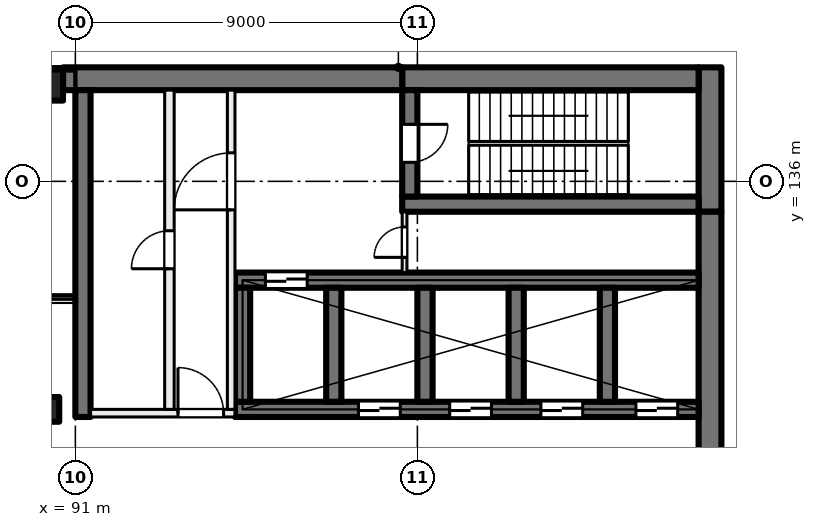
"""IFC4 building model, lengths in metres.
Left out: names, types, materials, properties, quantities, classifications, styles, units other than length and angle.
Written with IfcOpenShell. Run it as: python <this file> out.ifc"""

import sys

from ifc_helpers import new_model, si_unit, direction, frame, frame_2d, origin, origin_2d, place, context, subcontext, project, spatial, rectangle, extrude, element, fill, save


model = new_model("IFC4")
c1 = context("Model", 3, precision=1e-05, world=origin(), true_north=direction((0.0, 1.0)))
c2 = subcontext(c1, "Body", "Model", "MODEL_VIEW")
j1 = project(units=[si_unit("LENGTHUNIT", "METRE"), si_unit("PLANEANGLEUNIT", "RADIAN")], contexts=[c1])
p1 = place(None, origin())
s1 = spatial("IfcSite", under=j1, at=p1, CompositionType="ELEMENT")
p2 = place(p1, origin())
s2 = spatial("IfcBuilding", under=s1, at=p2, CompositionType="ELEMENT")
p3 = place(p2, frame((0.0, 0.0, 129.0)))
s3 = spatial("IfcBuildingStorey", under=s2, at=p3, CompositionType="ELEMENT", Elevation=129.0)
p4 = place(p3, frame((90.25, 130.0, 0.0), z_axis=(0.0, 0.0, 1.0), x_axis=(1.0, 0.0, 0.0)))
e1 = element("IfcColumn", 1, at=p4, inside=s3, PredefinedType="COLUMN", context=c2, shape_type="SweptSolid", body=[
    extrude(rectangle(XDim=0.65, YDim=0.65, at=origin_2d()), origin(), (0.0, 0.0, 1.0), 5.5),
])
p5 = place(p3, frame((90.25, 138.55, 0.0), z_axis=(0.0, 0.0, 1.0), x_axis=(1.0, 0.0, 0.0)))
e2 = element("IfcColumn", 2, at=p5, inside=s3, PredefinedType="COLUMN", context=c2, shape_type="SweptSolid", body=[
    extrude(rectangle(XDim=0.85, YDim=0.85, at=origin_2d()), origin(), (0.0, 0.0, 1.0), 5.5),
])
p6 = place(p3, frame((107.7, 139.0, 0.0), z_axis=(0.0, 0.0, 1.0), x_axis=(0.0, -1.0, 0.0)))
e3 = element("IfcWall", 3, at=p6, inside=s3, PredefinedType="SHEAR", context=c2, shape_type="SweptSolid", body=[
    extrude(rectangle(XDim=3.8, YDim=0.6, at=frame_2d((1.9, 0.0))), origin(), (0.0, 0.0, 1.0), 5.5),
])
p7 = place(p3, frame((107.7, 135.2, 0.0), z_axis=(0.0, 0.0, 1.0), x_axis=(0.0, -1.0, 0.0)))
e4 = element("IfcWall", 4, at=p7, inside=s3, PredefinedType="SHEAR", context=c2, shape_type="SweptSolid", body=[
    extrude(rectangle(XDim=14.4, YDim=0.6, at=frame_2d((7.2, 0.0))), origin(), (0.0, 0.0, 1.0), 5.5),
])
p8 = place(p3, frame((107.4, 138.7, 0.0), z_axis=(0.0, 0.0, 1.0), x_axis=(-1.0, 0.0, 0.0)))
e5 = element("IfcWall", 5, at=p8, inside=s3, PredefinedType="SHEAR", context=c2, shape_type="SweptSolid", body=[
    extrude(rectangle(XDim=7.8, YDim=0.6, at=frame_2d((3.9, 0.0))), origin(), (0.0, 0.0, 1.0), 5.5),
])
p9 = place(p3, frame((99.6, 138.7, 0.0), z_axis=(0.0, 0.0, 1.0), x_axis=(-1.0, 0.0, 0.0)))
e6 = element("IfcWall", 6, at=p9, inside=s3, PredefinedType="SHEAR", context=c2, shape_type="SweptSolid", body=[
    extrude(rectangle(XDim=8.925, YDim=0.6, at=frame_2d((4.462, 0.0))), origin(), (0.0, 0.0, 1.0), 5.5),
])
p10 = place(p3, frame((107.4, 135.4, 0.0), z_axis=(0.0, 0.0, 1.0), x_axis=(-1.0, 0.0, 0.0)))
e7 = element("IfcWall", 7, at=p10, inside=s3, PredefinedType="SHEAR", context=c2, shape_type="SweptSolid", body=[
    extrude(rectangle(XDim=7.8, YDim=0.4, at=frame_2d((3.9, 0.0))), origin(), (0.0, 0.0, 1.0), 5.5),
])
p11 = place(p3, frame((99.8, 138.4, 0.0), z_axis=(0.0, 0.0, 1.0), x_axis=(0.0, -1.0, 0.0)))
e8 = element("IfcWall", 8, at=p11, inside=s3, PredefinedType="SHEAR", context=c2, shape_type="SweptSolid", body=[
    extrude(rectangle(XDim=2.8, YDim=0.4, at=frame_2d((1.4, 0.0))), origin(), (0.0, 0.0, 1.0), 5.5),
])
p12 = place(p11, frame((0.9, 0.0, 0.0)))
e9 = element("IfcOpeningElement", 9, at=p12, cuts=e8, PredefinedType="OPENING", context=c2, shape_type="SweptSolid", body=[
    extrude(rectangle(XDim=1.0, YDim=2.1, at=frame_2d((0.5, 1.05))), frame((0.0, 0.21, 0.0), z_axis=(0.0, -1.0, 0.0), x_axis=(1.0, 0.0, 0.0)), (0.0, 0.0, 1.0), 0.42),
])
p13 = place(p3, frame((107.4, 130.0, 0.0), z_axis=(0.0, 0.0, 1.0), x_axis=(-1.0, 0.0, 0.0)))
e10 = element("IfcWall", 10, at=p13, inside=s3, PredefinedType="SHEAR", context=c2, shape_type="SweptSolid", body=[
    extrude(rectangle(XDim=12.2, YDim=0.4, at=frame_2d((6.1, 0.0))), origin(), (0.0, 0.0, 1.0), 5.5),
])
p14 = place(p13, frame((0.55, 0.0, 0.0)))
e11 = element("IfcOpeningElement", 11, at=p14, cuts=e10, PredefinedType="OPENING", context=c2, shape_type="SweptSolid", body=[
    extrude(rectangle(XDim=1.1, YDim=2.1, at=frame_2d((0.55, 1.05))), frame((0.0, 0.21, 0.0), z_axis=(0.0, -1.0, 0.0), x_axis=(1.0, 0.0, 0.0)), (0.0, 0.0, 1.0), 0.42),
])
p15 = place(p13, frame((3.05, 0.0, 0.0)))
e12 = element("IfcOpeningElement", 12, at=p15, cuts=e10, PredefinedType="OPENING", context=c2, shape_type="SweptSolid", body=[
    extrude(rectangle(XDim=1.1, YDim=2.1, at=frame_2d((0.55, 1.05))), frame((0.0, 0.21, 0.0), z_axis=(0.0, -1.0, 0.0), x_axis=(1.0, 0.0, 0.0)), (0.0, 0.0, 1.0), 0.42),
])
p16 = place(p13, frame((5.45, 0.0, 0.0)))
e13 = element("IfcOpeningElement", 13, at=p16, cuts=e10, PredefinedType="OPENING", context=c2, shape_type="SweptSolid", body=[
    extrude(rectangle(XDim=1.1, YDim=2.1, at=frame_2d((0.55, 1.05))), frame((0.0, 0.21, 0.0), z_axis=(0.0, -1.0, 0.0), x_axis=(1.0, 0.0, 0.0)), (0.0, 0.0, 1.0), 0.42),
])
p17 = place(p13, frame((7.85, 0.0, 0.0)))
e14 = element("IfcOpeningElement", 14, at=p17, cuts=e10, PredefinedType="OPENING", context=c2, shape_type="SweptSolid", body=[
    extrude(rectangle(XDim=1.1, YDim=2.1, at=frame_2d((0.55, 1.05))), frame((0.0, 0.21, 0.0), z_axis=(0.0, -1.0, 0.0), x_axis=(1.0, 0.0, 0.0)), (0.0, 0.0, 1.0), 0.42),
])
p18 = place(p3, frame((107.4, 133.4, 0.0), z_axis=(0.0, 0.0, 1.0), x_axis=(-1.0, 0.0, 0.0)))
e15 = element("IfcWall", 15, at=p18, inside=s3, PredefinedType="SHEAR", context=c2, shape_type="SweptSolid", body=[
    extrude(rectangle(XDim=12.2, YDim=0.4, at=frame_2d((6.1, 0.0))), origin(), (0.0, 0.0, 1.0), 5.5),
])
p19 = place(p18, frame((10.3, 0.0, 0.0)))
e16 = element("IfcOpeningElement", 16, at=p19, cuts=e15, PredefinedType="OPENING", context=c2, shape_type="SweptSolid", body=[
    extrude(rectangle(XDim=1.1, YDim=2.1, at=frame_2d((0.55, 1.05))), frame((0.0, 0.21, 0.0), z_axis=(0.0, -1.0, 0.0), x_axis=(1.0, 0.0, 0.0)), (0.0, 0.0, 1.0), 0.42),
])
for number, where, z_axis, x_axis in (
    (17, (105.0, 133.2, 0.0), (0.0, 0.0, 1.0), (0.0, -1.0, 0.0)),
    (18, (102.6, 133.2, 0.0), (0.0, 0.0, 1.0), (0.0, -1.0, 0.0)),
    (19, (100.2, 133.2, 0.0), (0.0, 0.0, 1.0), (0.0, -1.0, 0.0)),
    (20, (97.8, 133.2, 0.0), (0.0, 0.0, 1.0), (0.0, -1.0, 0.0)),
    (21, (95.4, 133.2, 0.0), (0.0, 0.0, 1.0), (0.0, -1.0, 0.0)),
):
    element("IfcWall", number, at=place(p3, frame(where, z_axis=z_axis, x_axis=x_axis)), inside=s3, PredefinedType="SHEAR", context=c2, shape_type="SweptSolid", body=[
        extrude(rectangle(XDim=3.0, YDim=0.4, at=frame_2d((1.5, 0.0))), origin(), (0.0, 0.0, 1.0), 5.5),
    ])
p20 = place(p3, frame((91.2, 138.4, 0.0), z_axis=(0.0, 0.0, 1.0), x_axis=(0.0, -1.0, 0.0)))
e22 = element("IfcWall", 22, at=p20, inside=s3, PredefinedType="SHEAR", context=c2, shape_type="SweptSolid", body=[
    extrude(rectangle(XDim=8.6, YDim=0.4, at=frame_2d((4.3, 0.0))), origin(), (0.0, 0.0, 1.0), 5.5),
])
p21 = place(p3, frame((91.4, 129.9, 0.0), z_axis=(0.0, 0.0, 1.0), x_axis=(1.0, 0.0, 0.0)))
e23 = element("IfcWall", 23, at=p21, inside=s3, PredefinedType="PARTITIONING", context=c2, shape_type="SweptSolid", body=[
    extrude(rectangle(XDim=3.8, YDim=0.2, at=frame_2d((1.9, 0.0))), origin(), (0.0, 0.0, 1.0), 5.125),
])
p22 = place(p21, frame((2.3, 0.0, 0.0)))
e24 = element("IfcOpeningElement", 24, at=p22, cuts=e23, PredefinedType="OPENING", context=c2, shape_type="SweptSolid", body=[
    extrude(rectangle(XDim=1.2, YDim=2.1, at=frame_2d((0.6, 1.05))), frame((0.0, 0.11, 0.0), z_axis=(0.0, -1.0, 0.0), x_axis=(1.0, 0.0, 0.0)), (0.0, 0.0, 1.0), 0.22),
])
p23 = place(p3, frame((95.1, 130.0, 0.0), z_axis=(0.0, 0.0, 1.0), x_axis=(0.0, 1.0, 0.0)))
e25 = element("IfcWall", 25, at=p23, inside=s3, PredefinedType="PARTITIONING", context=c2, shape_type="SweptSolid", body=[
    extrude(rectangle(XDim=8.4, YDim=0.2, at=frame_2d((4.2, 0.0))), origin(), (0.0, 0.0, 1.0), 5.125),
])
p24 = place(p23, frame((5.25, 0.0, 0.0)))
e26 = element("IfcOpeningElement", 26, at=p24, cuts=e25, PredefinedType="OPENING", context=c2, shape_type="SweptSolid", body=[
    extrude(rectangle(XDim=1.5, YDim=2.1, at=frame_2d((0.75, 1.05))), frame((0.0, 0.11, 0.0), z_axis=(0.0, -1.0, 0.0), x_axis=(1.0, 0.0, 0.0)), (0.0, 0.0, 1.0), 0.22),
])
p25 = place(p3, frame((93.475, 130.0, 0.0), z_axis=(0.0, 0.0, 1.0), x_axis=(0.0, 1.0, 0.0)))
e27 = element("IfcWall", 27, at=p25, inside=s3, PredefinedType="PARTITIONING", context=c2, shape_type="SweptSolid", body=[
    extrude(rectangle(XDim=8.4, YDim=0.25, at=frame_2d((4.2, 0.0))), origin(), (0.0, 0.0, 1.0), 5.125),
])
p26 = place(p25, frame((3.7, 0.0, 0.0)))
e28 = element("IfcOpeningElement", 28, at=p26, cuts=e27, PredefinedType="OPENING", context=c2, shape_type="SweptSolid", body=[
    extrude(rectangle(XDim=1.0, YDim=2.1, at=frame_2d((0.5, 1.05))), frame((0.0, 0.135, 0.0), z_axis=(0.0, -1.0, 0.0), x_axis=(1.0, 0.0, 0.0)), (0.0, 0.0, 1.0), 0.27),
])
p27 = place(p3, frame((99.663, 133.6, 0.0), z_axis=(0.0, 0.0, 1.0), x_axis=(0.0, 1.0, 0.0)))
e29 = element("IfcWall", 29, at=p27, inside=s3, PredefinedType="PARTITIONING", context=c2, shape_type="SweptSolid", body=[
    extrude(rectangle(XDim=1.6, YDim=0.125, at=frame_2d((0.8, 0.0))), origin(), (0.0, 0.0, 1.0), 5.125),
])
p28 = place(p27, frame((0.4, 0.0, 0.0)))
e30 = element("IfcOpeningElement", 30, at=p28, cuts=e29, PredefinedType="OPENING", context=c2, shape_type="SweptSolid", body=[
    extrude(rectangle(XDim=0.8, YDim=2.1, at=frame_2d((0.4, 1.05))), frame((0.0, 0.073, 0.0), z_axis=(0.0, -1.0, 0.0), x_axis=(1.0, 0.0, 0.0)), (0.0, 0.0, 1.0), 0.145),
])
p29 = place(p14, origin())
e31 = element("IfcDoor", 31, at=p29, inside=s3, OperationType="DOUBLE_DOOR_SLIDING", PredefinedType="DOOR", context=c2, shape_type="SweptSolid", body=[
    extrude(rectangle(XDim=1.1, YDim=2.1, at=frame_2d((0.55, 1.05))), frame((0.0, 0.025, 0.0), z_axis=(0.0, -1.0, 0.0), x_axis=(1.0, 0.0, 0.0)), (0.0, 0.0, 1.0), 0.05),
])
fill(e11, e31)
p30 = place(p15, origin())
e32 = element("IfcDoor", 32, at=p30, inside=s3, OperationType="DOUBLE_DOOR_SLIDING", PredefinedType="DOOR", context=c2, shape_type="SweptSolid", body=[
    extrude(rectangle(XDim=1.1, YDim=2.1, at=frame_2d((0.55, 1.05))), frame((0.0, 0.025, 0.0), z_axis=(0.0, -1.0, 0.0), x_axis=(1.0, 0.0, 0.0)), (0.0, 0.0, 1.0), 0.05),
])
fill(e12, e32)
p31 = place(p16, origin())
e33 = element("IfcDoor", 33, at=p31, inside=s3, OperationType="DOUBLE_DOOR_SLIDING", PredefinedType="DOOR", context=c2, shape_type="SweptSolid", body=[
    extrude(rectangle(XDim=1.1, YDim=2.1, at=frame_2d((0.55, 1.05))), frame((0.0, 0.025, 0.0), z_axis=(0.0, -1.0, 0.0), x_axis=(1.0, 0.0, 0.0)), (0.0, 0.0, 1.0), 0.05),
])
fill(e13, e33)
p32 = place(p17, origin())
e34 = element("IfcDoor", 34, at=p32, inside=s3, OperationType="DOUBLE_DOOR_SLIDING", PredefinedType="DOOR", context=c2, shape_type="SweptSolid", body=[
    extrude(rectangle(XDim=1.1, YDim=2.1, at=frame_2d((0.55, 1.05))), frame((0.0, 0.025, 0.0), z_axis=(0.0, -1.0, 0.0), x_axis=(1.0, 0.0, 0.0)), (0.0, 0.0, 1.0), 0.05),
])
fill(e14, e34)
p33 = place(p22, origin())
e35 = element("IfcDoor", 35, at=p33, inside=s3, OperationType="DOUBLE_DOOR_SINGLE_SWING", PredefinedType="DOOR", context=c2, shape_type="SweptSolid", body=[
    extrude(rectangle(XDim=1.2, YDim=2.1, at=frame_2d((0.6, 1.05))), frame((0.0, 0.025, 0.0), z_axis=(0.0, -1.0, 0.0), x_axis=(1.0, 0.0, 0.0)), (0.0, 0.0, 1.0), 0.05),
])
fill(e24, e35)
p34 = place(p24, origin())
e36 = element("IfcDoor", 36, at=p34, inside=s3, OperationType="DOUBLE_DOOR_SINGLE_SWING", PredefinedType="DOOR", context=c2, shape_type="SweptSolid", body=[
    extrude(rectangle(XDim=1.5, YDim=2.1, at=frame_2d((0.75, 1.05))), frame((0.0, 0.025, 0.0), z_axis=(0.0, -1.0, 0.0), x_axis=(1.0, 0.0, 0.0)), (0.0, 0.0, 1.0), 0.05),
])
fill(e26, e36)
p35 = place(p12, origin())
e37 = element("IfcDoor", 37, at=p35, inside=s3, OperationType="SINGLE_SWING_RIGHT", PredefinedType="DOOR", context=c2, shape_type="SweptSolid", body=[
    extrude(rectangle(XDim=1.0, YDim=2.1, at=frame_2d((0.5, 1.05))), frame((0.0, 0.025, 0.0), z_axis=(0.0, -1.0, 0.0), x_axis=(1.0, 0.0, 0.0)), (0.0, 0.0, 1.0), 0.05),
])
fill(e9, e37)
p36 = place(p28, origin())
e38 = element("IfcDoor", 38, at=p36, inside=s3, OperationType="SINGLE_SWING_LEFT", PredefinedType="DOOR", context=c2, shape_type="SweptSolid", body=[
    extrude(rectangle(XDim=0.8, YDim=2.1, at=frame_2d((0.4, 1.05))), frame((0.0, 0.025, 0.0), z_axis=(0.0, -1.0, 0.0), x_axis=(1.0, 0.0, 0.0)), (0.0, 0.0, 1.0), 0.05),
])
fill(e30, e38)
p37 = place(p26, origin())
e39 = element("IfcDoor", 39, at=p37, inside=s3, OperationType="SINGLE_SWING_RIGHT", PredefinedType="DOOR", context=c2, shape_type="SweptSolid", body=[
    extrude(rectangle(XDim=1.0, YDim=2.1, at=frame_2d((0.5, 1.05))), frame((0.0, 0.025, 0.0), z_axis=(0.0, -1.0, 0.0), x_axis=(1.0, 0.0, 0.0)), (0.0, 0.0, 1.0), 0.05),
])
fill(e28, e39)
p38 = place(p19, origin())
e40 = element("IfcDoor", 40, at=p38, inside=s3, OperationType="DOUBLE_DOOR_SLIDING", PredefinedType="DOOR", context=c2, shape_type="SweptSolid", body=[
    extrude(rectangle(XDim=1.1, YDim=2.1, at=frame_2d((0.55, 1.05))), frame((0.0, 0.025, 0.0), z_axis=(0.0, -1.0, 0.0), x_axis=(1.0, 0.0, 0.0)), (0.0, 0.0, 1.0), 0.05),
])
fill(e16, e40)
save(model, sys.argv[1])
